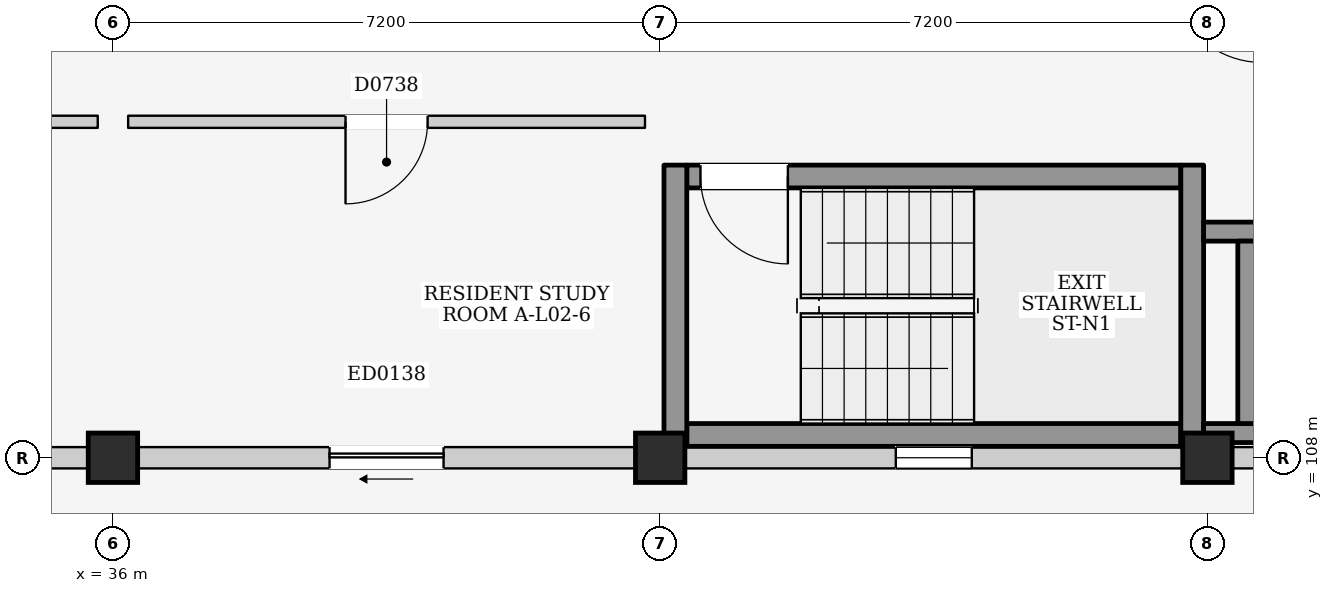
"""IFC4 building model, lengths in metres.
Left out: names, types, materials, properties, quantities, classifications, styles, units other than length and angle.
Written with IfcOpenShell. Run it as: python <this file> out.ifc"""

import sys

from ifc_helpers import new_model, si_unit, direction, frame, frame_2d, origin, origin_2d, place, context, subcontext, project, spatial, rectangle, extrude, element, fill, save


model = new_model("IFC4")
c1 = context("Model", 3, precision=1e-05, world=origin(), true_north=direction((0.0, 1.0)))
c2 = subcontext(c1, "Body", "Model", "MODEL_VIEW")
j1 = project(units=[si_unit("LENGTHUNIT", "METRE"), si_unit("PLANEANGLEUNIT", "RADIAN")], contexts=[c1])
p1 = place(None, origin())
s1 = spatial("IfcSite", under=j1, at=p1, CompositionType="ELEMENT")
p2 = place(p1, origin())
s2 = spatial("IfcBuilding", under=s1, at=p2, CompositionType="ELEMENT")
p3 = place(p2, frame((0.0, 0.0, 9.0)))
s3 = spatial("IfcBuildingStorey", under=s2, at=p3, CompositionType="ELEMENT", Elevation=9.0)
for number, where, z_axis, x_axis in (
    (1, (36.0, 108.0, 0.0), (0.0, 0.0, 1.0), (1.0, 0.0, 0.0)),
    (2, (43.2, 108.0, 0.0), (0.0, 0.0, 1.0), (1.0, 0.0, 0.0)),
    (3, (50.4, 108.0, 0.0), (0.0, 0.0, 1.0), (1.0, 0.0, 0.0)),
):
    element("IfcColumn", number, at=place(p3, frame(where, z_axis=z_axis, x_axis=x_axis)), inside=s3, PredefinedType="COLUMN", context=c2, shape_type="SweptSolid", body=[
        extrude(rectangle(XDim=0.65, YDim=0.65, at=origin_2d()), origin(), (0.0, 0.0, 1.0), 3.2),
    ])
p4 = place(p3, frame((29.125, 108.0, 0.0), z_axis=(0.0, 0.0, 1.0), x_axis=(1.0, 0.0, 0.0)))
e4 = element("IfcWall", 4, at=p4, inside=s3, PredefinedType="ELEMENTEDWALL", context=c2, shape_type="SweptSolid", body=[
    extrude(rectangle(XDim=6.55, YDim=0.28, at=frame_2d((3.275, 0.0))), origin(), (0.0, 0.0, 1.0), 2.295),
])
p5 = place(p4, frame((2.525, 0.0, 0.0)))
e5 = element("IfcOpeningElement", 5, at=p5, cuts=e4, PredefinedType="OPENING", context=c2, shape_type="SweptSolid", body=[
    extrude(rectangle(XDim=1.5, YDim=2.12, at=frame_2d((0.75, 1.06))), frame((0.0, 0.155, 0.0), z_axis=(0.0, -1.0, 0.0), x_axis=(1.0, 0.0, 0.0)), (0.0, 0.0, 1.0), 0.31),
])
p6 = place(p3, frame((36.325, 108.0, 0.0), z_axis=(0.0, 0.0, 1.0), x_axis=(1.0, 0.0, 0.0)))
e6 = element("IfcWall", 6, at=p6, inside=s3, PredefinedType="ELEMENTEDWALL", context=c2, shape_type="SweptSolid", body=[
    extrude(rectangle(XDim=6.55, YDim=0.28, at=frame_2d((3.275, 0.0))), origin(), (0.0, 0.0, 1.0), 2.295),
])
p7 = place(p6, frame((2.525, 0.0, 0.0)))
e7 = element("IfcOpeningElement", 7, at=p7, cuts=e6, PredefinedType="OPENING", context=c2, shape_type="SweptSolid", body=[
    extrude(rectangle(XDim=1.5, YDim=2.12, at=frame_2d((0.75, 1.06))), frame((0.0, 0.155, 0.0), z_axis=(0.0, -1.0, 0.0), x_axis=(1.0, 0.0, 0.0)), (0.0, 0.0, 1.0), 0.31),
])
p8 = place(p3, frame((43.525, 108.0, 0.0), z_axis=(0.0, 0.0, 1.0), x_axis=(1.0, 0.0, 0.0)))
e8 = element("IfcWall", 8, at=p8, inside=s3, PredefinedType="ELEMENTEDWALL", context=c2, shape_type="SweptSolid", body=[
    extrude(rectangle(XDim=6.55, YDim=0.28, at=frame_2d((3.275, 0.0))), origin(), (0.0, 0.0, 1.0), 2.295),
])
p9 = place(p8, frame((2.775, 0.0, 1.2)))
e9 = element("IfcOpeningElement", 9, at=p9, cuts=e8, PredefinedType="OPENING", context=c2, shape_type="SweptSolid", body=[
    extrude(rectangle(XDim=1.0, YDim=0.9, at=frame_2d((0.5, 0.45))), frame((0.0, 0.155, 0.0), z_axis=(0.0, -1.0, 0.0), x_axis=(1.0, 0.0, 0.0)), (0.0, 0.0, 1.0), 0.31),
])
p10 = place(p3, frame((50.725, 108.0, 0.0), z_axis=(0.0, 0.0, 1.0), x_axis=(1.0, 0.0, 0.0)))
e10 = element("IfcWall", 10, at=p10, inside=s3, PredefinedType="ELEMENTEDWALL", context=c2, shape_type="SweptSolid", body=[
    extrude(rectangle(XDim=6.55, YDim=0.28, at=frame_2d((3.275, 0.0))), origin(), (0.0, 0.0, 1.0), 2.295),
])
p11 = place(p10, frame((2.775, 0.0, 1.2)))
e11 = element("IfcOpeningElement", 11, at=p11, cuts=e10, PredefinedType="OPENING", context=c2, shape_type="SweptSolid", body=[
    extrude(rectangle(XDim=1.0, YDim=0.9, at=frame_2d((0.5, 0.45))), frame((0.0, 0.155, 0.0), z_axis=(0.0, -1.0, 0.0), x_axis=(1.0, 0.0, 0.0)), (0.0, 0.0, 1.0), 0.31),
])
p12 = place(p3, frame((43.55, 108.3, 0.0), z_axis=(0.0, 0.0, 1.0), x_axis=(1.0, 0.0, 0.0)))
e12 = element("IfcWall", 12, at=p12, inside=s3, PredefinedType="SHEAR", context=c2, shape_type="SweptSolid", body=[
    extrude(rectangle(XDim=6.5, YDim=0.3, at=frame_2d((3.25, 0.0))), origin(), (0.0, 0.0, 1.0), 2.96),
])
p13 = place(p3, frame((43.55, 111.7, 0.0), z_axis=(0.0, 0.0, 1.0), x_axis=(1.0, 0.0, 0.0)))
e13 = element("IfcWall", 13, at=p13, inside=s3, PredefinedType="SHEAR", context=c2, shape_type="SweptSolid", body=[
    extrude(rectangle(XDim=6.5, YDim=0.3, at=frame_2d((3.25, 0.0))), origin(), (0.0, 0.0, 1.0), 2.96),
])
p14 = place(p13, frame((0.18, 0.0, 0.0)))
e14 = element("IfcOpeningElement", 14, at=p14, cuts=e13, PredefinedType="OPENING", context=c2, shape_type="SweptSolid", body=[
    extrude(rectangle(XDim=1.15, YDim=2.2, at=frame_2d((0.575, 1.1))), frame((0.0, 0.165, 0.0), z_axis=(0.0, -1.0, 0.0), x_axis=(1.0, 0.0, 0.0)), (0.0, 0.0, 1.0), 0.33),
])
for number, where, z_axis, x_axis in (
    (15, (43.4, 108.15, 0.0), (0.0, 0.0, 1.0), (0.0, 1.0, 0.0)),
    (16, (50.2, 108.15, 0.0), (0.0, 0.0, 1.0), (0.0, 1.0, 0.0)),
):
    element("IfcWall", number, at=place(p3, frame(where, z_axis=z_axis, x_axis=x_axis)), inside=s3, PredefinedType="SHEAR", context=c2, shape_type="SweptSolid", body=[
        extrude(rectangle(XDim=3.7, YDim=0.3, at=frame_2d((1.85, 0.0))), origin(), (0.0, 0.0, 1.0), 2.96),
    ])
p15 = place(p3, frame((50.35, 108.325, 0.0), z_axis=(0.0, 0.0, 1.0), x_axis=(1.0, 0.0, 0.0)))
e17 = element("IfcWall", 17, at=p15, inside=s3, PredefinedType="SHEAR", context=c2, shape_type="SweptSolid", body=[
    extrude(rectangle(XDim=2.675, YDim=0.25, at=frame_2d((1.337, 0.0))), origin(), (0.0, 0.0, 1.0), 2.96),
])
p16 = place(p3, frame((50.35, 110.975, 0.0), z_axis=(0.0, 0.0, 1.0), x_axis=(1.0, 0.0, 0.0)))
e18 = element("IfcWall", 18, at=p16, inside=s3, PredefinedType="SHEAR", context=c2, shape_type="SweptSolid", body=[
    extrude(rectangle(XDim=2.675, YDim=0.25, at=frame_2d((1.337, 0.0))), origin(), (0.0, 0.0, 1.0), 2.96),
])
p17 = place(p16, frame((1.0, 0.0, 0.0)))
e19 = element("IfcOpeningElement", 19, at=p17, cuts=e18, PredefinedType="OPENING", context=c2, shape_type="SweptSolid", body=[
    extrude(rectangle(XDim=1.2, YDim=2.25, at=frame_2d((0.6, 1.125))), frame((0.0, 0.14, 0.0), z_axis=(0.0, -1.0, 0.0), x_axis=(1.0, 0.0, 0.0)), (0.0, 0.0, 1.0), 0.28),
])
p18 = place(p3, frame((50.925, 108.45, 0.0), z_axis=(0.0, 0.0, 1.0), x_axis=(0.0, 1.0, 0.0)))
e20 = element("IfcWall", 20, at=p18, inside=s3, PredefinedType="SHEAR", context=c2, shape_type="SweptSolid", body=[
    extrude(rectangle(XDim=2.4, YDim=0.25, at=frame_2d((1.2, 0.0))), origin(), (0.0, 0.0, 1.0), 2.96),
])
p19 = place(p3, frame((29.0, 112.42, 0.0), z_axis=(0.0, 0.0, 1.0), x_axis=(1.0, 0.0, 0.0)))
e21 = element("IfcWall", 21, at=p19, inside=s3, PredefinedType="PARTITIONING", context=c2, shape_type="SweptSolid", body=[
    extrude(rectangle(XDim=6.8, YDim=0.16, at=frame_2d((3.4, 0.0))), origin(), (0.0, 0.0, 1.0), 2.96),
])
p20 = place(p19, frame((2.86, 0.0, 0.0)))
e22 = element("IfcOpeningElement", 22, at=p20, cuts=e21, PredefinedType="OPENING", context=c2, shape_type="SweptSolid", body=[
    extrude(rectangle(XDim=1.08, YDim=2.22, at=frame_2d((0.54, 1.11))), frame((0.0, 0.095, 0.0), z_axis=(0.0, -1.0, 0.0), x_axis=(1.0, 0.0, 0.0)), (0.0, 0.0, 1.0), 0.19),
])
p21 = place(p3, frame((36.2, 112.42, 0.0), z_axis=(0.0, 0.0, 1.0), x_axis=(1.0, 0.0, 0.0)))
e23 = element("IfcWall", 23, at=p21, inside=s3, PredefinedType="PARTITIONING", context=c2, shape_type="SweptSolid", body=[
    extrude(rectangle(XDim=6.8, YDim=0.16, at=frame_2d((3.4, 0.0))), origin(), (0.0, 0.0, 1.0), 2.96),
])
p22 = place(p21, frame((2.86, 0.0, 0.0)))
e24 = element("IfcOpeningElement", 24, at=p22, cuts=e23, PredefinedType="OPENING", context=c2, shape_type="SweptSolid", body=[
    extrude(rectangle(XDim=1.08, YDim=2.22, at=frame_2d((0.54, 1.11))), frame((0.0, 0.095, 0.0), z_axis=(0.0, -1.0, 0.0), x_axis=(1.0, 0.0, 0.0)), (0.0, 0.0, 1.0), 0.19),
])
p23 = place(p7, frame((1.5, 0.0, 0.0), z_axis=(0.0, 0.0, 1.0), x_axis=(-1.0, 0.0, 0.0)))
e25 = element("IfcDoor", 25, at=p23, inside=s3, OperationType="SLIDING_TO_LEFT", PredefinedType="DOOR", context=c2, shape_type="SweptSolid", body=[
    extrude(rectangle(XDim=1.5, YDim=2.12, at=frame_2d((0.75, 1.06))), frame((0.0, 0.025, 0.0), z_axis=(0.0, -1.0, 0.0), x_axis=(1.0, 0.0, 0.0)), (0.0, 0.0, 1.0), 0.05),
])
fill(e7, e25)
p24 = place(p9, origin())
e26 = element("IfcWindow", 26, at=p24, inside=s3, PartitioningType="SINGLE_PANEL", PredefinedType="WINDOW", context=c2, shape_type="SweptSolid", body=[
    extrude(rectangle(XDim=1.0, YDim=0.9, at=frame_2d((0.5, 0.45))), frame((0.0, 0.03, 0.0), z_axis=(0.0, -1.0, 0.0), x_axis=(1.0, 0.0, 0.0)), (0.0, 0.0, 1.0), 0.06),
])
fill(e9, e26)
p25 = place(p14, frame((1.15, 0.0, 0.0), z_axis=(0.0, 0.0, 1.0), x_axis=(-1.0, 0.0, 0.0)))
e27 = element("IfcDoor", 27, at=p25, inside=s3, OperationType="SINGLE_SWING_LEFT", PredefinedType="DOOR", context=c2, shape_type="SweptSolid", body=[
    extrude(rectangle(XDim=1.15, YDim=2.2, at=frame_2d((0.575, 1.1))), frame((0.0, 0.025, 0.0), z_axis=(0.0, -1.0, 0.0), x_axis=(1.0, 0.0, 0.0)), (0.0, 0.0, 1.0), 0.05),
])
fill(e14, e27)
p26 = place(p22, frame((1.08, 0.0, 0.0), z_axis=(0.0, 0.0, 1.0), x_axis=(-1.0, 0.0, 0.0)))
e28 = element("IfcDoor", 28, at=p26, inside=s3, OperationType="SINGLE_SWING_RIGHT", PredefinedType="DOOR", context=c2, shape_type="SweptSolid", body=[
    extrude(rectangle(XDim=1.08, YDim=2.22, at=frame_2d((0.54, 1.11))), frame((0.0, 0.025, 0.0), z_axis=(0.0, -1.0, 0.0), x_axis=(1.0, 0.0, 0.0)), (0.0, 0.0, 1.0), 0.05),
])
fill(e24, e28)
save(model, sys.argv[1])
